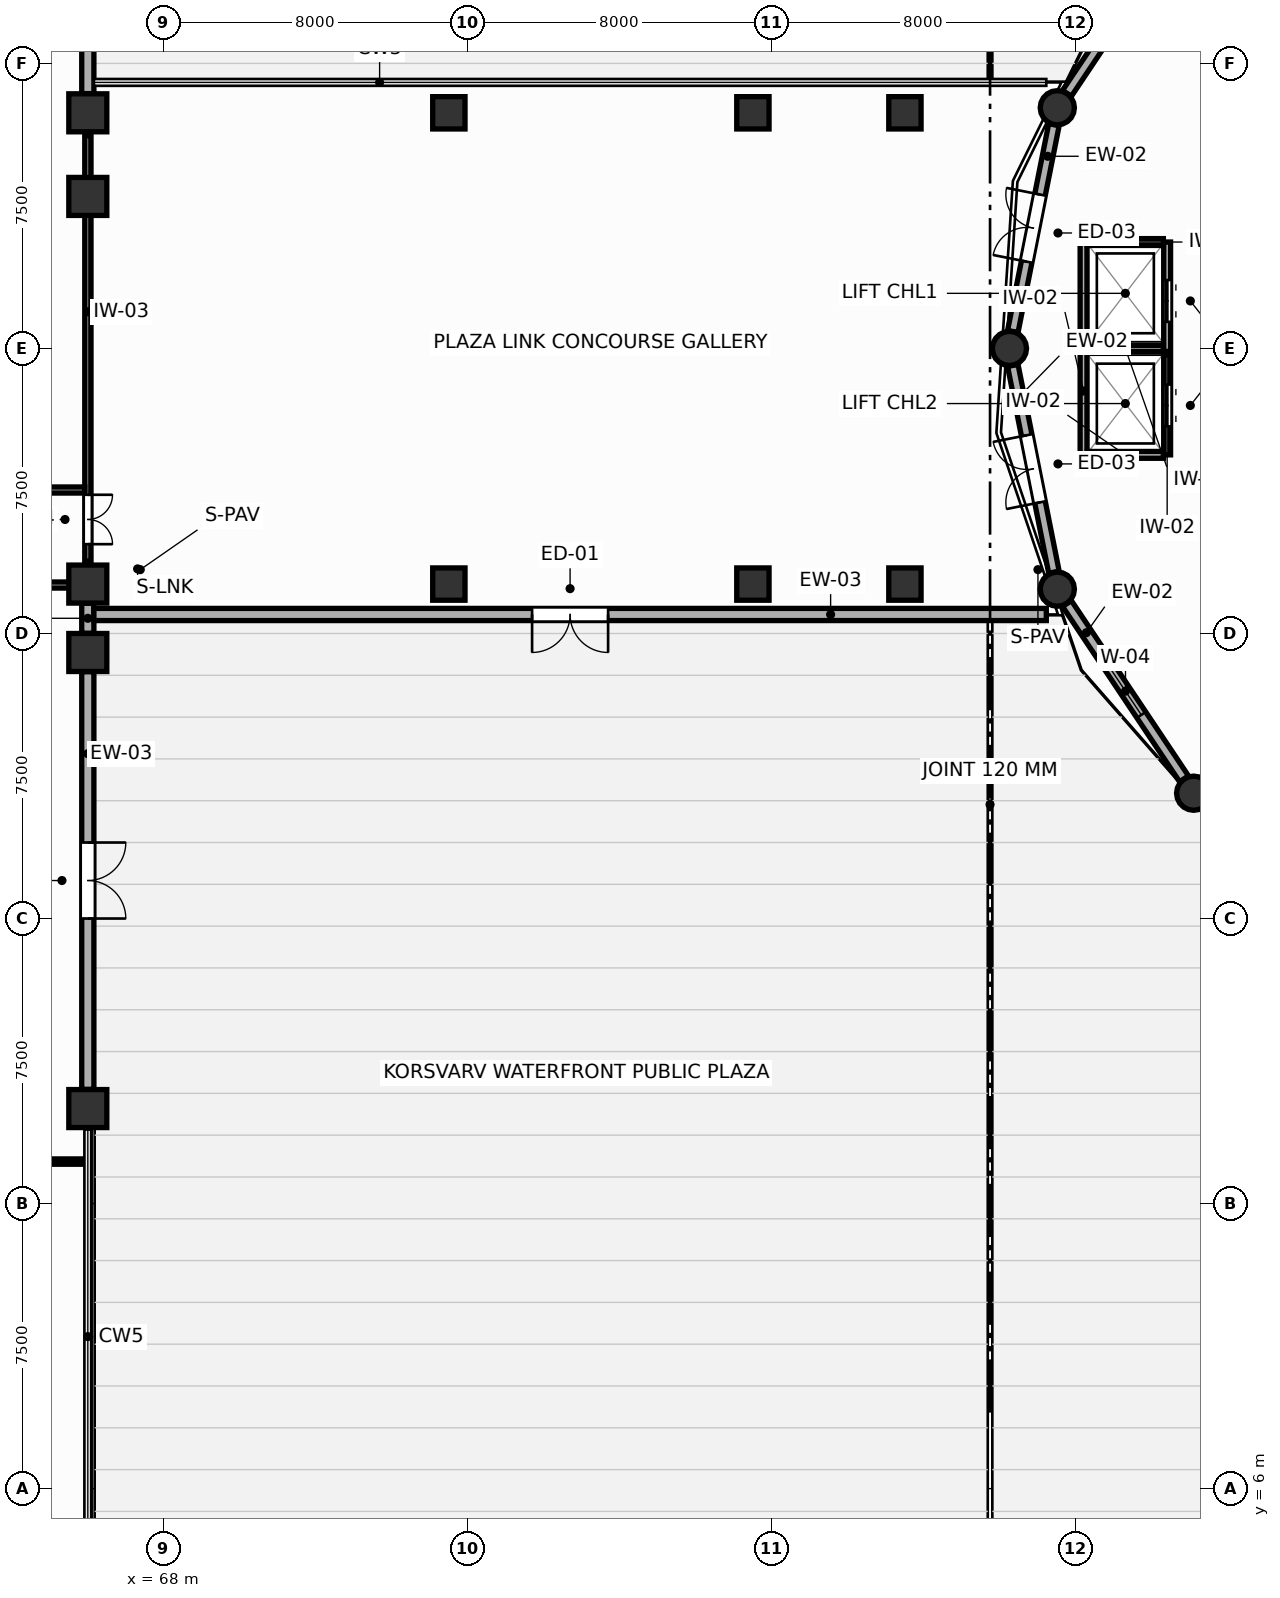
"""IFC4 building model, lengths in metres.
Left out: names, types, materials, properties, quantities, classifications, styles, units other than length and angle.
Written with IfcOpenShell. Run it as: python <this file> out.ifc"""

import sys

from ifc_helpers import new_model, si_unit, direction, frame, frame_2d, origin, origin_2d, place, context, subcontext, project, spatial, rectangle, circle, extrude, source, transform, mapped, element, fill, save


model = new_model("IFC4")
c1 = context("Model", 3, precision=1e-05, world=origin(), true_north=direction((0.0, 1.0)))
c2 = subcontext(c1, "Body", "Model", "MODEL_VIEW")
j1 = project(units=[si_unit("LENGTHUNIT", "METRE"), si_unit("PLANEANGLEUNIT", "RADIAN")], contexts=[c1])
p1 = place(None, origin())
s1 = spatial("IfcSite", under=j1, at=p1, CompositionType="ELEMENT")
p2 = place(p1, origin())
s2 = spatial("IfcBuilding", under=s1, at=p2, CompositionType="ELEMENT")
p3 = place(p2, origin())
s3 = spatial("IfcBuildingStorey", under=s2, at=p3, CompositionType="ELEMENT", Elevation=0.0)
m1 = source(origin(), c2, "Body", "SweptSolid", [
    extrude(rectangle(XDim=1.0, YDim=1.0, at=origin_2d()), origin(), (0.0, 0.0, 1.0), 4.8),
])
for number, where, z_axis, x_axis in (
    (1, (66.0, 16.0, 0.0), (0.0, 0.0, 1.0), (1.0, 0.0, 0.0)),
    (2, (66.0, 28.0, 0.0), (0.0, 0.0, 1.0), (1.0, 0.0, 0.0)),
    (3, (66.0, 40.0, 0.0), (0.0, 0.0, 1.0), (1.0, 0.0, 0.0)),
    (4, (66.0, 29.8, 0.0), (0.0, 0.0, 1.0), (1.0, 0.0, 0.0)),
    (5, (66.0, 42.2, 0.0), (0.0, 0.0, 1.0), (1.0, 0.0, 0.0)),
):
    element("IfcColumn", number, at=place(p3, frame(where, z_axis=z_axis, x_axis=x_axis)), inside=s3, PredefinedType="COLUMN", context=c2, shape_type="MappedRepresentation", body=[
        mapped(m1, transform((0.0, 0.0, 0.0), scale=1.0)),
    ])
m2 = source(origin(), c2, "Body", "SweptSolid", [
    extrude(rectangle(XDim=0.85, YDim=0.85, at=origin_2d()), origin(), (0.0, 0.0, 1.0), 4.8),
])
for number, where, z_axis, x_axis in (
    (6, (75.5, 29.8, 0.0), (0.0, 0.0, 1.0), (1.0, 0.0, 0.0)),
    (7, (75.5, 42.2, 0.0), (0.0, 0.0, 1.0), (1.0, 0.0, 0.0)),
    (8, (83.5, 29.8, 0.0), (0.0, 0.0, 1.0), (1.0, 0.0, 0.0)),
    (9, (83.5, 42.2, 0.0), (0.0, 0.0, 1.0), (1.0, 0.0, 0.0)),
    (10, (87.5, 29.8, 0.0), (0.0, 0.0, 1.0), (1.0, 0.0, 0.0)),
    (11, (87.5, 42.2, 0.0), (0.0, 0.0, 1.0), (1.0, 0.0, 0.0)),
):
    element("IfcColumn", number, at=place(p3, frame(where, z_axis=z_axis, x_axis=x_axis)), inside=s3, PredefinedType="COLUMN", context=c2, shape_type="MappedRepresentation", body=[
        mapped(m2, transform((0.0, 0.0, 0.0), scale=1.0)),
    ])
m3 = source(origin(), c2, "Body", "SweptSolid", [
    extrude(circle(Radius=0.45, at=origin_2d()), origin(), (0.0, 0.0, 1.0), 4.8),
])
for number, where, z_axis, x_axis in (
    (12, (91.51, 42.333, 0.0), (0.0, 0.0, 1.0), (1.0, 0.0, 0.0)),
    (13, (90.25, 36.0, 0.0), (0.0, 0.0, 1.0), (1.0, 0.0, 0.0)),
    (14, (91.51, 29.667, 0.0), (0.0, 0.0, 1.0), (1.0, 0.0, 0.0)),
    (15, (95.097, 24.297, 0.0), (0.0, 0.0, 1.0), (1.0, 0.0, 0.0)),
):
    element("IfcColumn", number, at=place(p3, frame(where, z_axis=z_axis, x_axis=x_axis)), inside=s3, PredefinedType="COLUMN", context=c2, shape_type="MappedRepresentation", body=[
        mapped(m3, transform((0.0, 0.0, 0.0), scale=1.0)),
    ])
p4 = place(p3, frame((66.0, 16.505, 0.0), z_axis=(0.0, 0.0, 1.0), x_axis=(0.0, 1.0, 0.0)))
e16 = element("IfcWall", 16, at=p4, inside=s3, PredefinedType="SOLIDWALL", context=c2, shape_type="SweptSolid", body=[
    extrude(rectangle(XDim=10.99, YDim=0.32, at=frame_2d((5.495, 0.0))), origin(), (0.0, 0.0, 1.0), 3.82),
])
p5 = place(p4, frame((4.495, 0.0, 0.0)))
e17 = element("IfcOpeningElement", 17, at=p5, cuts=e16, PredefinedType="OPENING", context=c2, shape_type="SweptSolid", body=[
    extrude(rectangle(XDim=2.0, YDim=2.25, at=frame_2d((1.0, 1.125))), frame((0.0, 0.17, 0.0), z_axis=(0.0, -1.0, 0.0), x_axis=(1.0, 0.0, 0.0)), (0.0, 0.0, 1.0), 0.34),
])
p6 = place(p3, frame((66.0, 28.505, 0.0), z_axis=(0.0, 0.0, 1.0), x_axis=(0.0, 1.0, 0.0)))
e18 = element("IfcWall", 18, at=p6, inside=s3, PredefinedType="SOLIDWALL", context=c2, shape_type="SweptSolid", body=[
    extrude(rectangle(XDim=0.79, YDim=0.32, at=frame_2d((0.395, 0.0))), origin(), (0.0, 0.0, 1.0), 3.82),
])
p7 = place(p3, frame((66.0, 42.705, 0.0), z_axis=(0.0, 0.0, 1.0), x_axis=(0.0, 1.0, 0.0)))
e19 = element("IfcWall", 19, at=p7, inside=s3, PredefinedType="SOLIDWALL", context=c2, shape_type="SweptSolid", body=[
    extrude(rectangle(XDim=7.27, YDim=0.32, at=frame_2d((3.635, 0.0))), origin(), (0.0, 0.0, 1.0), 3.82),
])
p8 = place(p7, frame((1.468, 0.0, 0.75)))
e20 = element("IfcOpeningElement", 20, at=p8, cuts=e19, PredefinedType="OPENING", context=c2, shape_type="SweptSolid", body=[
    extrude(rectangle(XDim=2.2, YDim=2.0, at=frame_2d((1.1, 1.0))), frame((0.0, 0.17, 0.0), z_axis=(0.0, -1.0, 0.0), x_axis=(1.0, 0.0, 0.0)), (0.0, 0.0, 1.0), 0.34),
])
p9 = place(p3, frame((66.16, 29.0, 0.0), z_axis=(0.0, 0.0, 1.0), x_axis=(1.0, 0.0, 0.0)))
e21 = element("IfcWall", 21, at=p9, inside=s3, PredefinedType="SOLIDWALL", context=c2, shape_type="SweptSolid", body=[
    extrude(rectangle(XDim=25.06, YDim=0.32, at=frame_2d((12.53, 0.0))), origin(), (0.0, 0.0, 1.0), 4.54),
])
p10 = place(p9, frame((11.53, 0.0, 0.0)))
e22 = element("IfcOpeningElement", 22, at=p10, cuts=e21, PredefinedType="OPENING", context=c2, shape_type="SweptSolid", body=[
    extrude(rectangle(XDim=2.0, YDim=2.25, at=frame_2d((1.0, 1.125))), frame((0.0, 0.17, 0.0), z_axis=(0.0, -1.0, 0.0), x_axis=(1.0, 0.0, 0.0)), (0.0, 0.0, 1.0), 0.34),
])
p11 = place(p3, frame((94.844, 47.324, 0.0), z_axis=(0.0, 0.0, 1.0), x_axis=(-0.555542879373, -0.831487888774, 0.0)))
e23 = element("IfcWall", 23, at=p11, inside=s3, PredefinedType="SOLIDWALL", context=c2, shape_type="SweptSolid", body=[
    extrude(rectangle(XDim=5.547, YDim=0.28, at=frame_2d((2.774, 0.0))), origin(), (0.0, 0.0, 1.0), 3.83),
])
p12 = place(p11, frame((2.024, 0.0, 0.75)))
e24 = element("IfcOpeningElement", 24, at=p12, cuts=e23, PredefinedType="OPENING", context=c2, shape_type="SweptSolid", body=[
    extrude(rectangle(XDim=1.5, YDim=1.85, at=frame_2d((0.75, 0.925))), frame((0.0, 0.15, 0.0), z_axis=(0.0, -1.0, 0.0), x_axis=(1.0, 0.0, 0.0)), (0.0, 0.0, 1.0), 0.3),
])
p13 = place(p3, frame((91.421, 41.887, 0.0), z_axis=(0.0, 0.0, 1.0), x_axis=(-0.19504963768, -0.980793372144, 0.0)))
e25 = element("IfcWall", 25, at=p13, inside=s3, PredefinedType="SOLIDWALL", context=c2, shape_type="SweptSolid", body=[
    extrude(rectangle(XDim=5.547, YDim=0.28, at=frame_2d((2.774, 0.0))), origin(), (0.0, 0.0, 1.0), 3.83),
])
p14 = place(p13, frame((1.874, 0.0, 0.0)))
e26 = element("IfcOpeningElement", 26, at=p14, cuts=e25, PredefinedType="OPENING", context=c2, shape_type="SweptSolid", body=[
    extrude(rectangle(XDim=1.8, YDim=2.2, at=frame_2d((0.9, 1.1))), frame((0.0, 0.15, 0.0), z_axis=(0.0, -1.0, 0.0), x_axis=(1.0, 0.0, 0.0)), (0.0, 0.0, 1.0), 0.3),
])
p15 = place(p3, frame((90.339, 35.554, 0.0), z_axis=(0.0, 0.0, 1.0), x_axis=(0.19504963768, -0.980793372144, 0.0)))
e27 = element("IfcWall", 27, at=p15, inside=s3, PredefinedType="SOLIDWALL", context=c2, shape_type="SweptSolid", body=[
    extrude(rectangle(XDim=5.547, YDim=0.28, at=frame_2d((2.774, 0.0))), origin(), (0.0, 0.0, 1.0), 3.83),
])
p16 = place(p15, frame((1.874, 0.0, 0.0)))
e28 = element("IfcOpeningElement", 28, at=p16, cuts=e27, PredefinedType="OPENING", context=c2, shape_type="SweptSolid", body=[
    extrude(rectangle(XDim=1.8, YDim=2.2, at=frame_2d((0.9, 1.1))), frame((0.0, 0.15, 0.0), z_axis=(0.0, -1.0, 0.0), x_axis=(1.0, 0.0, 0.0)), (0.0, 0.0, 1.0), 0.3),
])
p17 = place(p3, frame((91.763, 29.288, 0.0), z_axis=(0.0, 0.0, 1.0), x_axis=(0.555542879373, -0.831487888774, 0.0)))
e29 = element("IfcWall", 29, at=p17, inside=s3, PredefinedType="SOLIDWALL", context=c2, shape_type="SweptSolid", body=[
    extrude(rectangle(XDim=5.547, YDim=0.28, at=frame_2d((2.774, 0.0))), origin(), (0.0, 0.0, 1.0), 3.83),
])
p18 = place(p17, frame((2.024, 0.0, 0.75)))
e30 = element("IfcOpeningElement", 30, at=p18, cuts=e29, PredefinedType="OPENING", context=c2, shape_type="SweptSolid", body=[
    extrude(rectangle(XDim=1.5, YDim=1.85, at=frame_2d((0.75, 0.925))), frame((0.0, 0.15, 0.0), z_axis=(0.0, -1.0, 0.0), x_axis=(1.0, 0.0, 0.0)), (0.0, 0.0, 1.0), 0.3),
])
p19 = place(p3, frame((94.4, 33.2, 0.0), z_axis=(0.0, 0.0, 1.0), x_axis=(0.0, 1.0, 0.0)))
e31 = element("IfcWall", 31, at=p19, inside=s3, PredefinedType="PARTITIONING", context=c2, shape_type="SweptSolid", body=[
    extrude(rectangle(XDim=5.6, YDim=0.18, at=frame_2d((2.8, 0.0))), origin(), (0.0, 0.0, 1.0), 4.52),
])
p20 = place(p19, frame((3.5, 0.0, 0.0)))
e32 = element("IfcOpeningElement", 32, at=p20, cuts=e31, PredefinedType="OPENING", context=c2, shape_type="SweptSolid", body=[
    extrude(rectangle(XDim=1.1, YDim=2.1, at=frame_2d((0.55, 1.05))), frame((0.0, 0.1, 0.0), z_axis=(0.0, -1.0, 0.0), x_axis=(1.0, 0.0, 0.0)), (0.0, 0.0, 1.0), 0.2),
])
p21 = place(p19, frame((0.75, 0.0, 0.0)))
e33 = element("IfcOpeningElement", 33, at=p21, cuts=e31, PredefinedType="OPENING", context=c2, shape_type="SweptSolid", body=[
    extrude(rectangle(XDim=1.1, YDim=2.1, at=frame_2d((0.55, 1.05))), frame((0.0, 0.1, 0.0), z_axis=(0.0, -1.0, 0.0), x_axis=(1.0, 0.0, 0.0)), (0.0, 0.0, 1.0), 0.2),
])
p22 = place(p3, frame((92.2, 33.2, 0.0), z_axis=(0.0, 0.0, 1.0), x_axis=(0.0, 1.0, 0.0)))
e34 = element("IfcWall", 34, at=p22, inside=s3, PredefinedType="PARTITIONING", context=c2, shape_type="SweptSolid", body=[
    extrude(rectangle(XDim=5.6, YDim=0.18, at=frame_2d((2.8, 0.0))), origin(), (0.0, 0.0, 1.0), 4.52),
])
for number, where, z_axis, x_axis in (
    (35, (92.3, 38.8, 0.0), (0.0, 0.0, 1.0), (1.0, 0.0, 0.0)),
    (36, (92.3, 33.2, 0.0), (0.0, 0.0, 1.0), (1.0, 0.0, 0.0)),
):
    element("IfcWall", number, at=place(p3, frame(where, z_axis=z_axis, x_axis=x_axis)), inside=s3, PredefinedType="PARTITIONING", context=c2, shape_type="SweptSolid", body=[
        extrude(rectangle(XDim=2.0, YDim=0.18, at=frame_2d((1.0, 0.0))), origin(), (0.0, 0.0, 1.0), 4.52),
    ])
p23 = place(p3, frame((92.3, 36.0, 0.0), z_axis=(0.0, 0.0, 1.0), x_axis=(1.0, 0.0, 0.0)))
e37 = element("IfcWall", 37, at=p23, inside=s3, PredefinedType="PARTITIONING", context=c2, shape_type="SweptSolid", body=[
    extrude(rectangle(XDim=2.0, YDim=0.16, at=frame_2d((1.0, 0.0))), origin(), (0.0, 0.0, 1.0), 4.52),
])
p24 = place(p3, frame((66.0, 30.4, 0.0), z_axis=(0.0, 0.0, 1.0), x_axis=(0.0, 1.0, 0.0)))
e38 = element("IfcWall", 38, at=p24, inside=s3, PredefinedType="PARTITIONING", context=c2, shape_type="SweptSolid", body=[
    extrude(rectangle(XDim=11.2, YDim=0.16, at=frame_2d((5.6, 0.0))), origin(), (0.0, 0.0, 1.0), 3.82),
])
p25 = place(p24, frame((0.45, 0.0, 0.0)))
e39 = element("IfcOpeningElement", 39, at=p25, cuts=e38, PredefinedType="OPENING", context=c2, shape_type="SweptSolid", body=[
    extrude(rectangle(XDim=1.3, YDim=2.1, at=frame_2d((0.65, 1.05))), frame((0.0, 0.09, 0.0), z_axis=(0.0, -1.0, 0.0), x_axis=(1.0, 0.0, 0.0)), (0.0, 0.0, 1.0), 0.18),
])
p26 = place(p3, frame((47.357, 29.775, 0.0), z_axis=(0.0, 0.0, 1.0), x_axis=(1.0, 0.0, 0.0)))
e40 = element("IfcWall", 40, at=p26, inside=s3, PredefinedType="PARTITIONING", context=c2, shape_type="SweptSolid", body=[
    extrude(rectangle(XDim=18.623, YDim=0.16, at=frame_2d((9.312, 0.0))), origin(), (0.0, 0.0, 1.0), 4.52),
])
p27 = place(p3, frame((47.357, 32.275, 0.0), z_axis=(0.0, 0.0, 1.0), x_axis=(1.0, 0.0, 0.0)))
e41 = element("IfcWall", 41, at=p27, inside=s3, PredefinedType="PARTITIONING", context=c2, shape_type="SweptSolid", body=[
    extrude(rectangle(XDim=18.561, YDim=0.16, at=frame_2d((9.281, 0.0))), origin(), (0.0, 0.0, 1.0), 3.82),
])
p28 = place(p3, frame((47.357, 14.605, 0.0), z_axis=(0.0, 0.0, 1.0), x_axis=(1.0, 0.0, 0.0)))
e42 = element("IfcWall", 42, at=p28, inside=s3, PredefinedType="PARTITIONING", context=c2, shape_type="SweptSolid", body=[
    extrude(rectangle(XDim=18.623, YDim=0.14, at=frame_2d((9.312, 0.0))), origin(), (0.0, 0.0, 1.0), 4.52),
])
p29 = place(p5, frame((2.0, 0.0, 0.0), z_axis=(0.0, 0.0, 1.0), x_axis=(-1.0, 0.0, 0.0)))
e43 = element("IfcDoor", 43, at=p29, inside=s3, OperationType="DOUBLE_DOOR_SINGLE_SWING", PredefinedType="DOOR", context=c2, shape_type="SweptSolid", body=[
    extrude(rectangle(XDim=2.0, YDim=2.25, at=frame_2d((1.0, 1.125))), frame((0.0, 0.025, 0.0), z_axis=(0.0, -1.0, 0.0), x_axis=(1.0, 0.0, 0.0)), (0.0, 0.0, 1.0), 0.05),
])
fill(e17, e43)
p30 = place(p10, frame((2.0, 0.0, 0.0), z_axis=(0.0, 0.0, 1.0), x_axis=(-1.0, 0.0, 0.0)))
e44 = element("IfcDoor", 44, at=p30, inside=s3, OperationType="DOUBLE_DOOR_SINGLE_SWING", PredefinedType="DOOR", context=c2, shape_type="SweptSolid", body=[
    extrude(rectangle(XDim=2.0, YDim=2.25, at=frame_2d((1.0, 1.125))), frame((0.0, 0.025, 0.0), z_axis=(0.0, -1.0, 0.0), x_axis=(1.0, 0.0, 0.0)), (0.0, 0.0, 1.0), 0.05),
])
fill(e22, e44)
p31 = place(p14, frame((1.8, 0.0, 0.0), z_axis=(0.0, 0.0, 1.0), x_axis=(-1.0, 0.0, 0.0)))
e45 = element("IfcDoor", 45, at=p31, inside=s3, OperationType="DOUBLE_DOOR_SINGLE_SWING", PredefinedType="DOOR", context=c2, shape_type="SweptSolid", body=[
    extrude(rectangle(XDim=1.8, YDim=2.2, at=frame_2d((0.9, 1.1))), frame((0.0, 0.025, 0.0), z_axis=(0.0, -1.0, 0.0), x_axis=(1.0, 0.0, 0.0)), (0.0, 0.0, 1.0), 0.05),
])
fill(e26, e45)
p32 = place(p16, frame((1.8, 0.0, 0.0), z_axis=(0.0, 0.0, 1.0), x_axis=(-1.0, 0.0, 0.0)))
e46 = element("IfcDoor", 46, at=p32, inside=s3, OperationType="DOUBLE_DOOR_SINGLE_SWING", PredefinedType="DOOR", context=c2, shape_type="SweptSolid", body=[
    extrude(rectangle(XDim=1.8, YDim=2.2, at=frame_2d((0.9, 1.1))), frame((0.0, 0.025, 0.0), z_axis=(0.0, -1.0, 0.0), x_axis=(1.0, 0.0, 0.0)), (0.0, 0.0, 1.0), 0.05),
])
fill(e28, e46)
p33 = place(p18, origin())
e47 = element("IfcWindow", 47, at=p33, inside=s3, PartitioningType="SINGLE_PANEL", PredefinedType="WINDOW", context=c2, shape_type="SweptSolid", body=[
    extrude(rectangle(XDim=1.5, YDim=1.85, at=frame_2d((0.75, 0.925))), frame((0.0, 0.03, 0.0), z_axis=(0.0, -1.0, 0.0), x_axis=(1.0, 0.0, 0.0)), (0.0, 0.0, 1.0), 0.06),
])
fill(e30, e47)
p34 = place(p20, origin())
e48 = element("IfcDoor", 48, at=p34, inside=s3, OperationType="DOUBLE_DOOR_SLIDING", PredefinedType="DOOR", context=c2, shape_type="SweptSolid", body=[
    extrude(rectangle(XDim=1.1, YDim=2.1, at=frame_2d((0.55, 1.05))), frame((0.0, 0.025, 0.0), z_axis=(0.0, -1.0, 0.0), x_axis=(1.0, 0.0, 0.0)), (0.0, 0.0, 1.0), 0.05),
])
fill(e32, e48)
p35 = place(p21, origin())
e49 = element("IfcDoor", 49, at=p35, inside=s3, OperationType="DOUBLE_DOOR_SLIDING", PredefinedType="DOOR", context=c2, shape_type="SweptSolid", body=[
    extrude(rectangle(XDim=1.1, YDim=2.1, at=frame_2d((0.55, 1.05))), frame((0.0, 0.025, 0.0), z_axis=(0.0, -1.0, 0.0), x_axis=(1.0, 0.0, 0.0)), (0.0, 0.0, 1.0), 0.05),
])
fill(e33, e49)
p36 = place(p25, frame((1.3, 0.0, 0.0), z_axis=(0.0, 0.0, 1.0), x_axis=(-1.0, 0.0, 0.0)))
e50 = element("IfcDoor", 50, at=p36, inside=s3, OperationType="DOUBLE_DOOR_SINGLE_SWING", PredefinedType="DOOR", context=c2, shape_type="SweptSolid", body=[
    extrude(rectangle(XDim=1.3, YDim=2.1, at=frame_2d((0.65, 1.05))), frame((0.0, 0.025, 0.0), z_axis=(0.0, -1.0, 0.0), x_axis=(1.0, 0.0, 0.0)), (0.0, 0.0, 1.0), 0.05),
])
fill(e39, e50)
save(model, sys.argv[1])
